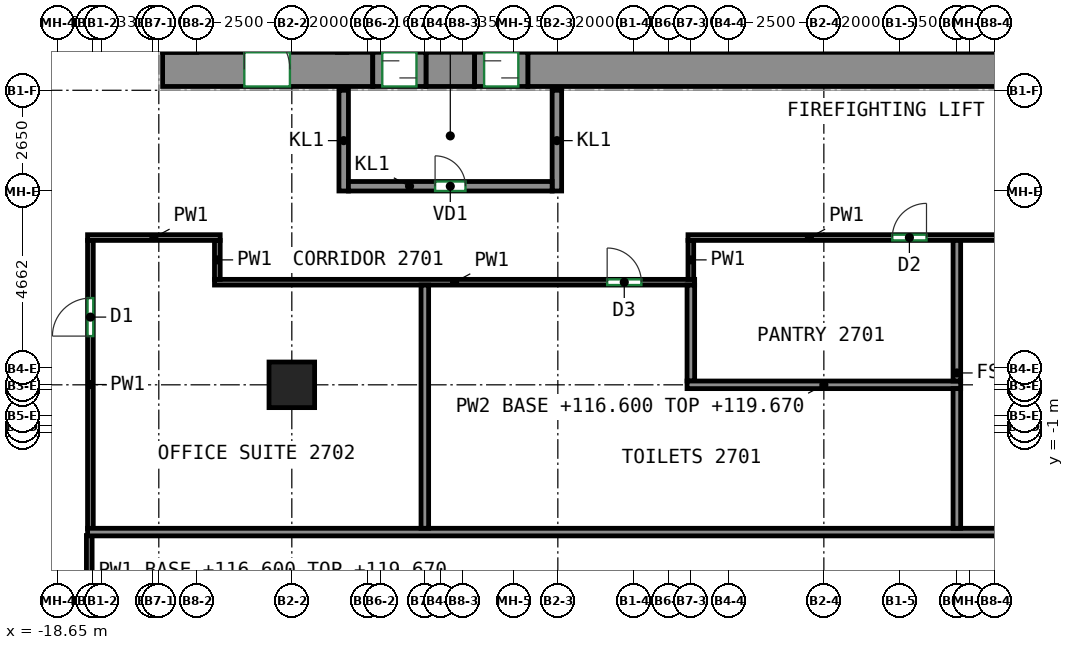
"""IFC4 building model, lengths in metres.
Left out: names, types, materials, properties, quantities, classifications, styles, units other than length and angle.
Written with IfcOpenShell. Run it as: python <this file> out.ifc"""

import sys

from ifc_helpers import new_model, si_unit, direction, frame, frame_2d, origin, origin_2d, place, context, subcontext, project, spatial, rectangle, extrude, source, transform, mapped, element, fill, save


model = new_model("IFC4")
c1 = context("Model", 3, precision=1e-05, world=origin(), true_north=direction((0.0, 1.0)))
c2 = subcontext(c1, "Body", "Model", "MODEL_VIEW")
j1 = project(units=[si_unit("LENGTHUNIT", "METRE"), si_unit("PLANEANGLEUNIT", "RADIAN")], contexts=[c1])
p1 = place(None, origin())
s1 = spatial("IfcSite", under=j1, at=p1, CompositionType="ELEMENT")
p2 = place(p1, origin())
s2 = spatial("IfcBuilding", under=s1, at=p2, CompositionType="ELEMENT")
p3 = place(p2, frame((0.0, 0.0, 116.6)))
s3 = spatial("IfcBuildingStorey", under=s2, at=p3, CompositionType="ELEMENT", Elevation=116.6)
m1 = source(origin(), c2, "Body", "SweptSolid", [
    extrude(rectangle(XDim=1.2, YDim=1.2, at=origin_2d()), origin(), (0.0, 0.0, 1.0), 3.72),
])
p4 = place(p3, frame((-12.5, 0.25, 0.0), z_axis=(0.0, 0.0, 1.0), x_axis=(1.0, 0.0, 0.0)))
e1 = element("IfcColumn", 1, at=p4, inside=s3, PredefinedType="COLUMN", context=c2, shape_type="MappedRepresentation", body=[
    mapped(m1, transform((0.0, 0.0, 0.0))),
])
m2 = source(origin(), c2, "Body", "SweptSolid", [
    extrude(rectangle(XDim=5.53, YDim=0.9, at=frame_2d((2.765, 0.0))), origin(), (0.0, 0.0, 1.0), 3.72),
])
p5 = place(p3, frame((-15.9, 8.55, 0.0), z_axis=(0.0, 0.0, 1.0), x_axis=(1.0, 0.0, 0.0)))
e2 = element("IfcWall", 2, at=p5, inside=s3, PredefinedType="SHEAR", context=c2, shape_type="MappedRepresentation", body=[
    mapped(m2, transform((0.0, 0.0, 0.0))),
])
p6 = place(p5, frame((2.15, 0.0, 0.0)))
e3 = element("IfcOpeningElement", 3, at=p6, cuts=e2, PredefinedType="OPENING", context=c2, shape_type="SweptSolid", body=[
    extrude(rectangle(XDim=1.2, YDim=2.1, at=frame_2d((0.6, 1.05))), frame((0.0, 0.46, 0.0), z_axis=(0.0, -1.0, 0.0), x_axis=(1.0, 0.0, 0.0)), (0.0, 0.0, 1.0), 0.92),
])
m3 = source(origin(), c2, "Body", "SweptSolid", [
    extrude(rectangle(XDim=1.28, YDim=0.9, at=frame_2d((0.64, 0.0))), origin(), (0.0, 0.0, 1.0), 3.72),
])
p7 = place(p3, frame((-8.97, 8.55, 0.0), z_axis=(0.0, 0.0, 1.0), x_axis=(1.0, 0.0, 0.0)))
e4 = element("IfcWall", 4, at=p7, inside=s3, PredefinedType="SHEAR", context=c2, shape_type="MappedRepresentation", body=[
    mapped(m3, transform((0.0, 0.0, 0.0))),
])
m4 = source(origin(), c2, "Body", "SweptSolid", [
    extrude(rectangle(XDim=14.18, YDim=0.9, at=frame_2d((7.09, 0.0))), origin(), (0.0, 0.0, 1.0), 3.72),
])
p8 = place(p3, frame((-6.29, 8.55, 0.0), z_axis=(0.0, 0.0, 1.0), x_axis=(1.0, 0.0, 0.0)))
e5 = element("IfcWall", 5, at=p8, inside=s3, PredefinedType="SHEAR", context=c2, shape_type="MappedRepresentation", body=[
    mapped(m4, transform((0.0, 0.0, 0.0))),
])
m5 = source(origin(), c2, "Body", "SweptSolid", [
    extrude(rectangle(XDim=2.65, YDim=0.25, at=frame_2d((1.325, 0.0))), origin(), (0.0, 0.0, 1.0), 3.72),
])
for number, where, z_axis, x_axis in (
    (6, (-11.135, 5.35, 0.0), (0.0, 0.0, 1.0), (0.0, 1.0, 0.0)),
    (7, (-5.525, 5.35, 0.0), (0.0, 0.0, 1.0), (0.0, 1.0, 0.0)),
):
    element("IfcWall", number, at=place(p3, frame(where, z_axis=z_axis, x_axis=x_axis)), inside=s3, PredefinedType="PARTITIONING", context=c2, shape_type="MappedRepresentation", body=[
        mapped(m5, transform((0.0, 0.0, 0.0))),
    ])
m6 = source(origin(), c2, "Body", "SweptSolid", [
    extrude(rectangle(XDim=5.36, YDim=0.25, at=frame_2d((2.68, 0.0))), origin(), (0.0, 0.0, 1.0), 3.72),
])
p9 = place(p3, frame((-11.01, 5.475, 0.0), z_axis=(0.0, 0.0, 1.0), x_axis=(1.0, 0.0, 0.0)))
e8 = element("IfcWall", 8, at=p9, inside=s3, PredefinedType="PARTITIONING", context=c2, shape_type="MappedRepresentation", body=[
    mapped(m6, transform((0.0, 0.0, 0.0))),
])
p10 = place(p9, frame((2.28, 0.0, 0.0)))
e9 = element("IfcOpeningElement", 9, at=p10, cuts=e8, PredefinedType="OPENING", context=c2, shape_type="SweptSolid", body=[
    extrude(rectangle(XDim=0.8, YDim=2.0, at=frame_2d((0.4, 1.0))), frame((0.0, 0.135, 0.0), z_axis=(0.0, -1.0, 0.0), x_axis=(1.0, 0.0, 0.0)), (0.0, 0.0, 1.0), 0.27),
])
m7 = source(origin(), c2, "Body", "SweptSolid", [
    extrude(rectangle(XDim=1.4, YDim=0.9, at=frame_2d((0.7, 0.0))), origin(), (0.0, 0.0, 1.0), 2.7),
])
p11 = place(p3, frame((-10.37, 8.55, 0.0), z_axis=(0.0, 0.0, 1.0), x_axis=(1.0, 0.0, 0.0)))
e10 = element("IfcWall", 10, at=p11, inside=s3, PredefinedType="PARTITIONING", context=c2, shape_type="MappedRepresentation", body=[
    mapped(m7, transform((0.0, 0.0, 0.0))),
])
p12 = place(p11, frame((0.25, 0.0, 0.0)))
e11 = element("IfcOpeningElement", 11, at=p12, cuts=e10, PredefinedType="OPENING", context=c2, shape_type="SweptSolid", body=[
    extrude(rectangle(XDim=0.9, YDim=2.1, at=frame_2d((0.45, 1.05))), frame((0.0, 0.46, 0.0), z_axis=(0.0, -1.0, 0.0), x_axis=(1.0, 0.0, 0.0)), (0.0, 0.0, 1.0), 0.92),
])
m8 = source(origin(), c2, "Body", "SweptSolid", [
    extrude(rectangle(XDim=1.4, YDim=0.9, at=frame_2d((0.7, 0.0))), origin(), (0.0, 0.0, 1.0), 2.7),
])
p13 = place(p3, frame((-7.69, 8.55, 0.0), z_axis=(0.0, 0.0, 1.0), x_axis=(1.0, 0.0, 0.0)))
e12 = element("IfcWall", 12, at=p13, inside=s3, PredefinedType="PARTITIONING", context=c2, shape_type="MappedRepresentation", body=[
    mapped(m8, transform((0.0, 0.0, 0.0))),
])
p14 = place(p13, frame((0.25, 0.0, 0.0)))
e13 = element("IfcOpeningElement", 13, at=p14, cuts=e12, PredefinedType="OPENING", context=c2, shape_type="SweptSolid", body=[
    extrude(rectangle(XDim=0.9, YDim=2.1, at=frame_2d((0.45, 1.05))), frame((0.0, 0.46, 0.0), z_axis=(0.0, -1.0, 0.0), x_axis=(1.0, 0.0, 0.0)), (0.0, 0.0, 1.0), 0.92),
])
p15 = place(p3, frame((-14.535, 2.95, 0.0), z_axis=(0.0, 0.0, 1.0), x_axis=(1.0, 0.0, 0.0)))
e14 = element("IfcWall", 14, at=p15, inside=s3, PredefinedType="PARTITIONING", context=c2, shape_type="SweptSolid", body=[
    extrude(rectangle(XDim=12.635, YDim=0.15, at=frame_2d((6.317, 0.0))), origin(), (0.0, 0.0, 1.0), 3.72),
])
p16 = place(p15, frame((10.333, 0.0, 0.0)))
e15 = element("IfcOpeningElement", 15, at=p16, cuts=e14, PredefinedType="OPENING", context=c2, shape_type="SweptSolid", body=[
    extrude(rectangle(XDim=0.9, YDim=2.1, at=frame_2d((0.45, 1.05))), frame((0.0, 0.085, 0.0), z_axis=(0.0, -1.0, 0.0), x_axis=(1.0, 0.0, 0.0)), (0.0, 0.0, 1.0), 0.17),
])
p17 = place(p3, frame((-14.46, 4.05, 0.0), z_axis=(0.0, 0.0, 1.0), x_axis=(0.0, -1.0, 0.0)))
e16 = element("IfcWall", 16, at=p17, inside=s3, PredefinedType="PARTITIONING", context=c2, shape_type="SweptSolid", body=[
    extrude(rectangle(XDim=1.025, YDim=0.15, at=frame_2d((0.513, 0.0))), origin(), (0.0, 0.0, 1.0), 3.72),
])
p18 = place(p3, frame((-17.875, 4.125, 0.0), z_axis=(0.0, 0.0, 1.0), x_axis=(1.0, 0.0, 0.0)))
e17 = element("IfcWall", 17, at=p18, inside=s3, PredefinedType="PARTITIONING", context=c2, shape_type="SweptSolid", body=[
    extrude(rectangle(XDim=3.49, YDim=0.15, at=frame_2d((1.745, 0.0))), origin(), (0.0, 0.0, 1.0), 3.72),
])
p19 = place(p3, frame((-17.8, -3.535, 0.0), z_axis=(0.0, 0.0, 1.0), x_axis=(0.0, 1.0, 0.0)))
e18 = element("IfcWall", 18, at=p19, inside=s3, PredefinedType="PARTITIONING", context=c2, shape_type="SweptSolid", body=[
    extrude(rectangle(XDim=7.585, YDim=0.15, at=frame_2d((3.792, 0.0))), origin(), (0.0, 0.0, 1.0), 3.72),
])
p20 = place(p19, frame((5.067, 0.0, 0.0)))
e19 = element("IfcOpeningElement", 19, at=p20, cuts=e18, PredefinedType="OPENING", context=c2, shape_type="SweptSolid", body=[
    extrude(rectangle(XDim=1.0, YDim=2.1, at=frame_2d((0.5, 1.05))), frame((0.0, 0.085, 0.0), z_axis=(0.0, -1.0, 0.0), x_axis=(1.0, 0.0, 0.0)), (0.0, 0.0, 1.0), 0.17),
])
p21 = place(p3, frame((-17.83, -15.675, 0.0), z_axis=(0.0, 0.0, 1.0), x_axis=(0.0, 1.0, 0.0)))
e20 = element("IfcWall", 20, at=p21, inside=s3, PredefinedType="PARTITIONING", context=c2, shape_type="SweptSolid", body=[
    extrude(rectangle(XDim=11.96, YDim=0.15, at=frame_2d((5.98, 0.0))), origin(), (0.0, 0.0, 1.0), 3.72),
])
p22 = place(p21, frame((8.249, 0.0, 0.0)))
e21 = element("IfcOpeningElement", 21, at=p22, cuts=e20, PredefinedType="OPENING", context=c2, shape_type="SweptSolid", body=[
    extrude(rectangle(XDim=1.8, YDim=2.1, at=frame_2d((0.9, 1.05))), frame((0.0, 0.085, 0.0), z_axis=(0.0, -1.0, 0.0), x_axis=(1.0, 0.0, 0.0)), (0.0, 0.0, 1.0), 0.17),
])
p23 = place(p3, frame((-2.075, 4.125, 0.0), z_axis=(0.0, 0.0, 1.0), x_axis=(1.0, 0.0, 0.0)))
e22 = element("IfcWall", 22, at=p23, inside=s3, PredefinedType="PARTITIONING", context=c2, shape_type="SweptSolid", body=[
    extrude(rectangle(XDim=10.65, YDim=0.15, at=frame_2d((5.325, 0.0))), origin(), (0.0, 0.0, 1.0), 3.72),
])
p24 = place(p23, frame((5.376, 0.0, 0.0)))
e23 = element("IfcOpeningElement", 23, at=p24, cuts=e22, PredefinedType="OPENING", context=c2, shape_type="SweptSolid", body=[
    extrude(rectangle(XDim=0.9, YDim=2.1, at=frame_2d((0.45, 1.05))), frame((0.0, 0.085, 0.0), z_axis=(0.0, -1.0, 0.0), x_axis=(1.0, 0.0, 0.0)), (0.0, 0.0, 1.0), 0.17),
])
p25 = place(p3, frame((-2.0, 3.025, 0.0), z_axis=(0.0, 0.0, 1.0), x_axis=(0.0, 1.0, 0.0)))
e24 = element("IfcWall", 24, at=p25, inside=s3, PredefinedType="PARTITIONING", context=c2, shape_type="SweptSolid", body=[
    extrude(rectangle(XDim=1.025, YDim=0.15, at=frame_2d((0.513, 0.0))), origin(), (0.0, 0.0, 1.0), 3.72),
])
p26 = place(p3, frame((-17.874, -3.625, 0.0), z_axis=(0.0, 0.0, 1.0), x_axis=(1.0, 0.0, 0.0)))
e25 = element("IfcWall", 25, at=p26, inside=s3, PredefinedType="PARTITIONING", context=c2, shape_type="SweptSolid", body=[
    extrude(rectangle(XDim=33.474, YDim=0.2, at=frame_2d((16.737, 0.0))), origin(), (0.0, 0.0, 1.0), 3.72),
])
p27 = place(p3, frame((-9.0, -3.525, 0.0), z_axis=(0.0, 0.0, 1.0), x_axis=(0.0, 1.0, 0.0)))
e26 = element("IfcWall", 26, at=p27, inside=s3, PredefinedType="PARTITIONING", context=c2, shape_type="SweptSolid", body=[
    extrude(rectangle(XDim=6.399, YDim=0.2, at=frame_2d((3.199, 0.0))), origin(), (0.0, 0.0, 1.0), 3.72),
])
p28 = place(p3, frame((-2.0, 0.35, 0.0), z_axis=(0.0, 0.0, 1.0), x_axis=(0.0, 1.0, 0.0)))
e27 = element("IfcWall", 27, at=p28, inside=s3, PredefinedType="PARTITIONING", context=c2, shape_type="SweptSolid", body=[
    extrude(rectangle(XDim=2.524, YDim=0.2, at=frame_2d((1.262, 0.0))), origin(), (0.0, 0.0, 1.0), 3.72),
])
p29 = place(p3, frame((-2.1, 0.25, 0.0), z_axis=(0.0, 0.0, 1.0), x_axis=(1.0, 0.0, 0.0)))
e28 = element("IfcWall", 28, at=p29, inside=s3, PredefinedType="PARTITIONING", context=c2, shape_type="SweptSolid", body=[
    extrude(rectangle(XDim=7.2, YDim=0.2, at=frame_2d((3.6, 0.0))), origin(), (0.0, 0.0, 1.0), 3.07),
])
p30 = place(p3, frame((5.0, -3.525, 0.0), z_axis=(0.0, 0.0, 1.0), x_axis=(0.0, 1.0, 0.0)))
e29 = element("IfcWall", 29, at=p30, inside=s3, PredefinedType="PARTITIONING", context=c2, shape_type="SweptSolid", body=[
    extrude(rectangle(XDim=3.675, YDim=0.2, at=frame_2d((1.837, 0.0))), origin(), (0.0, 0.0, 1.0), 3.72),
])
p31 = place(p3, frame((5.0, 0.35, 0.0), z_axis=(0.0, 0.0, 1.0), x_axis=(0.0, 1.0, 0.0)))
e30 = element("IfcWall", 30, at=p31, inside=s3, PredefinedType="PARTITIONING", context=c2, shape_type="SweptSolid", body=[
    extrude(rectangle(XDim=3.699, YDim=0.2, at=frame_2d((1.85, 0.0))), origin(), (0.0, 0.0, 1.0), 3.72),
])
p32 = place(p10, origin())
e31 = element("IfcDoor", 31, at=p32, inside=s3, OperationType="SINGLE_SWING_LEFT", PredefinedType="DOOR", context=c2, shape_type="SweptSolid", body=[
    extrude(rectangle(XDim=0.8, YDim=2.0, at=frame_2d((0.4, 1.0))), frame((0.0, 0.025, 0.0), z_axis=(0.0, -1.0, 0.0), x_axis=(1.0, 0.0, 0.0)), (0.0, 0.0, 1.0), 0.05),
])
fill(e9, e31)
p33 = place(p12, origin())
e32 = element("IfcDoor", 32, at=p33, inside=s3, OperationType="SLIDING_TO_LEFT", PredefinedType="DOOR", context=c2, shape_type="SweptSolid", body=[
    extrude(rectangle(XDim=0.9, YDim=2.1, at=frame_2d((0.45, 1.05))), frame((0.0, 0.355, 0.0), z_axis=(0.0, -1.0, 0.0), x_axis=(1.0, 0.0, 0.0)), (0.0, 0.0, 1.0), 0.05),
])
fill(e11, e32)
p34 = place(p14, origin())
e33 = element("IfcDoor", 33, at=p34, inside=s3, OperationType="SLIDING_TO_RIGHT", PredefinedType="DOOR", context=c2, shape_type="SweptSolid", body=[
    extrude(rectangle(XDim=0.9, YDim=2.1, at=frame_2d((0.45, 1.05))), frame((0.0, 0.355, 0.0), z_axis=(0.0, -1.0, 0.0), x_axis=(1.0, 0.0, 0.0)), (0.0, 0.0, 1.0), 0.05),
])
fill(e13, e33)
p35 = place(p6, origin())
e34 = element("IfcDoor", 34, at=p35, inside=s3, OperationType="DOUBLE_DOOR_SINGLE_SWING", PredefinedType="DOOR", context=c2, shape_type="SweptSolid", body=[
    extrude(rectangle(XDim=1.2, YDim=2.1, at=frame_2d((0.6, 1.05))), frame((0.0, 0.355, 0.0), z_axis=(0.0, -1.0, 0.0), x_axis=(1.0, 0.0, 0.0)), (0.0, 0.0, 1.0), 0.05),
])
fill(e3, e34)
p36 = place(p20, origin())
e35 = element("IfcDoor", 35, at=p36, inside=s3, OperationType="SINGLE_SWING_LEFT", PredefinedType="DOOR", context=c2, shape_type="SweptSolid", body=[
    extrude(rectangle(XDim=1.0, YDim=2.1, at=frame_2d((0.5, 1.05))), frame((0.0, 0.025, 0.0), z_axis=(0.0, -1.0, 0.0), x_axis=(1.0, 0.0, 0.0)), (0.0, 0.0, 1.0), 0.05),
])
fill(e19, e35)
p37 = place(p16, origin())
e36 = element("IfcDoor", 36, at=p37, inside=s3, OperationType="SINGLE_SWING_LEFT", PredefinedType="DOOR", context=c2, shape_type="SweptSolid", body=[
    extrude(rectangle(XDim=0.9, YDim=2.1, at=frame_2d((0.45, 1.05))), frame((0.0, 0.025, 0.0), z_axis=(0.0, -1.0, 0.0), x_axis=(1.0, 0.0, 0.0)), (0.0, 0.0, 1.0), 0.05),
])
fill(e15, e36)
p38 = place(p24, origin())
e37 = element("IfcDoor", 37, at=p38, inside=s3, OperationType="SINGLE_SWING_RIGHT", PredefinedType="DOOR", context=c2, shape_type="SweptSolid", body=[
    extrude(rectangle(XDim=0.9, YDim=2.1, at=frame_2d((0.45, 1.05))), frame((0.0, 0.025, 0.0), z_axis=(0.0, -1.0, 0.0), x_axis=(1.0, 0.0, 0.0)), (0.0, 0.0, 1.0), 0.05),
])
fill(e23, e37)
save(model, sys.argv[1])
